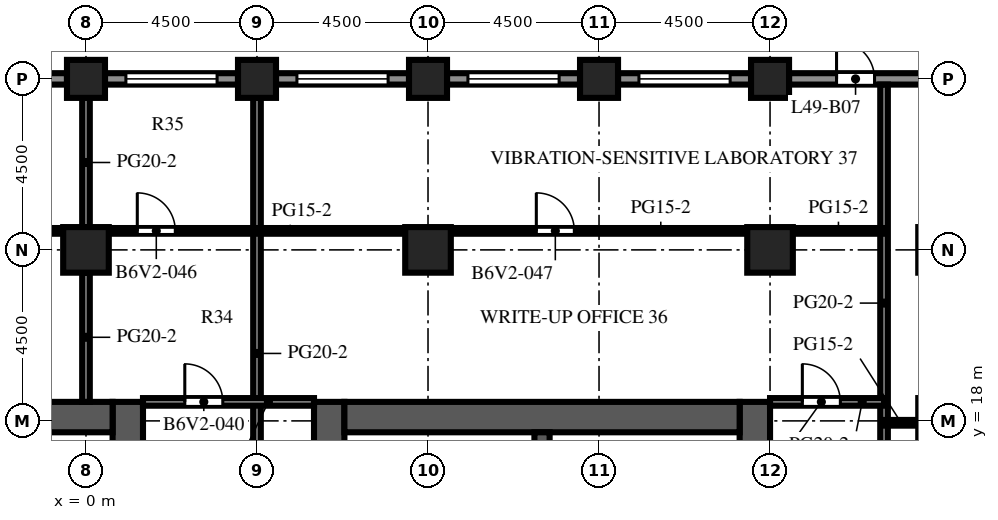
"""IFC4 building model, lengths in metres.
Left out: names, types, materials, properties, quantities, classifications, styles, units other than length and angle.
Written with IfcOpenShell. Run it as: python <this file> out.ifc"""

import sys

from ifc_helpers import new_model, si_unit, direction, frame, frame_2d, origin, origin_2d, place, context, subcontext, project, spatial, rectangle, extrude, element, fill, save


model = new_model("IFC4")
c1 = context("Model", 3, precision=1e-05, world=origin(), true_north=direction((0.0, 1.0)))
c2 = subcontext(c1, "Body", "Model", "MODEL_VIEW")
j1 = project(units=[si_unit("LENGTHUNIT", "METRE"), si_unit("PLANEANGLEUNIT", "RADIAN")], contexts=[c1])
p1 = place(None, origin())
s1 = spatial("IfcSite", under=j1, at=p1, CompositionType="ELEMENT")
p2 = place(p1, origin())
s2 = spatial("IfcBuilding", under=s1, at=p2, CompositionType="ELEMENT")
p3 = place(p2, frame((0.0, 0.0, 216.1)))
s3 = spatial("IfcBuildingStorey", under=s2, at=p3, CompositionType="ELEMENT", Elevation=216.1)
for number, where, z_axis, x_axis in (
    (1, (0.0, 27.0, 0.0), (0.0, 0.0, 1.0), (1.0, 0.0, 0.0)),
    (2, (4.5, 27.0, 0.0), (0.0, 0.0, 1.0), (1.0, 0.0, 0.0)),
    (3, (9.0, 27.0, 0.0), (0.0, 0.0, 1.0), (1.0, 0.0, 0.0)),
    (4, (13.5, 27.0, 0.0), (0.0, 0.0, 1.0), (1.0, 0.0, 0.0)),
    (5, (18.0, 27.0, 0.0), (0.0, 0.0, 1.0), (1.0, 0.0, 0.0)),
):
    element("IfcColumn", number, at=place(p3, frame(where, z_axis=z_axis, x_axis=x_axis)), inside=s3, PredefinedType="COLUMN", context=c2, shape_type="SweptSolid", body=[
        extrude(rectangle(XDim=1.0, YDim=1.0, at=origin_2d()), origin(), (0.0, 0.0, 1.0), 4.1),
    ])
for number, where, z_axis, x_axis in (
    (6, (0.0, 22.5, 0.0), (0.0, 0.0, 1.0), (1.0, 0.0, 0.0)),
    (7, (9.0, 22.5, 0.0), (0.0, 0.0, 1.0), (1.0, 0.0, 0.0)),
    (8, (18.0, 22.5, 0.0), (0.0, 0.0, 1.0), (1.0, 0.0, 0.0)),
):
    element("IfcColumn", number, at=place(p3, frame(where, z_axis=z_axis, x_axis=x_axis)), inside=s3, PredefinedType="COLUMN", context=c2, shape_type="SweptSolid", body=[
        extrude(rectangle(XDim=1.2, YDim=1.2, at=origin_2d()), origin(), (0.0, 0.0, 1.0), 4.1),
    ])
p4 = place(p3, frame((1.1, -9.0, 0.0), z_axis=(0.0, 0.0, 1.0), x_axis=(0.0, 1.0, 0.0)))
e9 = element("IfcWall", 9, at=p4, inside=s3, PredefinedType="SHEAR", context=c2, shape_type="SweptSolid", body=[
    extrude(rectangle(XDim=27.5, YDim=0.8, at=frame_2d((13.75, 0.0))), origin(), (0.0, 0.0, 1.0), 4.1),
])
p5 = place(p4, frame((12.55, 0.0, 0.0)))
e10 = element("IfcOpeningElement", 10, at=p5, cuts=e9, PredefinedType="OPENING", context=c2, shape_type="SweptSolid", body=[
    extrude(rectangle(XDim=2.4, YDim=2.4, at=frame_2d((1.2, 1.2))), frame((0.0, 0.41, 0.0), z_axis=(0.0, -1.0, 0.0), x_axis=(1.0, 0.0, 0.0)), (0.0, 0.0, 1.0), 0.82),
])
p6 = place(p4, frame((5.5, 0.0, 0.0)))
e11 = element("IfcOpeningElement", 11, at=p6, cuts=e9, PredefinedType="OPENING", context=c2, shape_type="SweptSolid", body=[
    extrude(rectangle(XDim=0.95, YDim=2.1, at=frame_2d((0.475, 1.05))), frame((0.0, 0.41, 0.0), z_axis=(0.0, -1.0, 0.0), x_axis=(1.0, 0.0, 0.0)), (0.0, 0.0, 1.0), 0.82),
])
p7 = place(p4, frame((23.475, 0.0, 0.0)))
e12 = element("IfcOpeningElement", 12, at=p7, cuts=e9, PredefinedType="OPENING", context=c2, shape_type="SweptSolid", body=[
    extrude(rectangle(XDim=1.2, YDim=2.1, at=frame_2d((0.6, 1.05))), frame((0.0, 0.41, 0.0), z_axis=(0.0, -1.0, 0.0), x_axis=(1.0, 0.0, 0.0)), (0.0, 0.0, 1.0), 0.82),
])
p8 = place(p3, frame((-9.7, 18.1, 0.0), z_axis=(0.0, 0.0, 1.0), x_axis=(1.0, 0.0, 0.0)))
e13 = element("IfcWall", 13, at=p8, inside=s3, PredefinedType="SHEAR", context=c2, shape_type="SweptSolid", body=[
    extrude(rectangle(XDim=10.4, YDim=0.8, at=frame_2d((5.2, 0.0))), origin(), (0.0, 0.0, 1.0), 4.1),
])
p9 = place(p3, frame((6.4, -9.0, 0.0), z_axis=(0.0, 0.0, 1.0), x_axis=(0.0, 1.0, 0.0)))
e14 = element("IfcWall", 14, at=p9, inside=s3, PredefinedType="SHEAR", context=c2, shape_type="SweptSolid", body=[
    extrude(rectangle(XDim=27.5, YDim=0.8, at=frame_2d((13.75, 0.0))), origin(), (0.0, 0.0, 1.0), 4.1),
])
p10 = place(p9, frame((12.55, 0.0, 0.0)))
e15 = element("IfcOpeningElement", 15, at=p10, cuts=e14, PredefinedType="OPENING", context=c2, shape_type="SweptSolid", body=[
    extrude(rectangle(XDim=2.4, YDim=2.4, at=frame_2d((1.2, 1.2))), frame((0.0, 0.41, 0.0), z_axis=(0.0, -1.0, 0.0), x_axis=(1.0, 0.0, 0.0)), (0.0, 0.0, 1.0), 0.82),
])
p11 = place(p9, frame((5.5, 0.0, 0.0)))
e16 = element("IfcOpeningElement", 16, at=p11, cuts=e14, PredefinedType="OPENING", context=c2, shape_type="SweptSolid", body=[
    extrude(rectangle(XDim=0.95, YDim=2.1, at=frame_2d((0.475, 1.05))), frame((0.0, 0.41, 0.0), z_axis=(0.0, -1.0, 0.0), x_axis=(1.0, 0.0, 0.0)), (0.0, 0.0, 1.0), 0.82),
])
p12 = place(p9, frame((23.475, 0.0, 0.0)))
e17 = element("IfcOpeningElement", 17, at=p12, cuts=e14, PredefinedType="OPENING", context=c2, shape_type="SweptSolid", body=[
    extrude(rectangle(XDim=1.2, YDim=2.1, at=frame_2d((0.6, 1.05))), frame((0.0, 0.41, 0.0), z_axis=(0.0, -1.0, 0.0), x_axis=(1.0, 0.0, 0.0)), (0.0, 0.0, 1.0), 0.82),
])
p13 = place(p3, frame((17.6, -9.0, 0.0), z_axis=(0.0, 0.0, 1.0), x_axis=(0.0, 1.0, 0.0)))
e18 = element("IfcWall", 18, at=p13, inside=s3, PredefinedType="SHEAR", context=c2, shape_type="SweptSolid", body=[
    extrude(rectangle(XDim=27.5, YDim=0.8, at=frame_2d((13.75, 0.0))), origin(), (0.0, 0.0, 1.0), 4.1),
])
p14 = place(p13, frame((12.55, 0.0, 0.0)))
e19 = element("IfcOpeningElement", 19, at=p14, cuts=e18, PredefinedType="OPENING", context=c2, shape_type="SweptSolid", body=[
    extrude(rectangle(XDim=2.4, YDim=2.4, at=frame_2d((1.2, 1.2))), frame((0.0, 0.41, 0.0), z_axis=(0.0, -1.0, 0.0), x_axis=(1.0, 0.0, 0.0)), (0.0, 0.0, 1.0), 0.82),
])
p15 = place(p13, frame((6.825, 0.0, 0.0)))
e20 = element("IfcOpeningElement", 20, at=p15, cuts=e18, PredefinedType="OPENING", context=c2, shape_type="SweptSolid", body=[
    extrude(rectangle(XDim=1.2, YDim=2.1, at=frame_2d((0.6, 1.05))), frame((0.0, 0.41, 0.0), z_axis=(0.0, -1.0, 0.0), x_axis=(1.0, 0.0, 0.0)), (0.0, 0.0, 1.0), 0.82),
])
p16 = place(p13, frame((19.475, 0.0, 0.0)))
e21 = element("IfcOpeningElement", 21, at=p16, cuts=e18, PredefinedType="OPENING", context=c2, shape_type="SweptSolid", body=[
    extrude(rectangle(XDim=1.2, YDim=2.1, at=frame_2d((0.6, 1.05))), frame((0.0, 0.41, 0.0), z_axis=(0.0, -1.0, 0.0), x_axis=(1.0, 0.0, 0.0)), (0.0, 0.0, 1.0), 0.82),
])
p17 = place(p3, frame((6.8, 18.1, 0.0), z_axis=(0.0, 0.0, 1.0), x_axis=(1.0, 0.0, 0.0)))
e22 = element("IfcWall", 22, at=p17, inside=s3, PredefinedType="SHEAR", context=c2, shape_type="SweptSolid", body=[
    extrude(rectangle(XDim=10.4, YDim=0.8, at=frame_2d((5.2, 0.0))), origin(), (0.0, 0.0, 1.0), 4.1),
])
p18 = place(p3, frame((12.0, 10.2, 0.0), z_axis=(0.0, 0.0, 1.0), x_axis=(0.0, 1.0, 0.0)))
e23 = element("IfcWall", 23, at=p18, inside=s3, PredefinedType="SHEAR", context=c2, shape_type="SweptSolid", body=[
    extrude(rectangle(XDim=7.5, YDim=0.4, at=frame_2d((3.75, 0.0))), origin(), (0.0, 0.0, 1.0), 4.1),
])
p19 = place(p3, frame((18.5, 27.0, 0.0), z_axis=(0.0, 0.0, 1.0), x_axis=(1.0, 0.0, 0.0)))
e24 = element("IfcWall", 24, at=p19, inside=s3, PredefinedType="SOLIDWALL", context=c2, shape_type="SweptSolid", body=[
    extrude(rectangle(XDim=3.5, YDim=0.3, at=frame_2d((1.75, 0.0))), origin(), (0.0, 0.0, 1.0), 2.7),
])
p20 = place(p19, frame((1.25, 0.0, 0.0)))
e25 = element("IfcOpeningElement", 25, at=p20, cuts=e24, PredefinedType="OPENING", context=c2, shape_type="SweptSolid", body=[
    extrude(rectangle(XDim=1.0, YDim=2.2, at=frame_2d((0.5, 1.1))), frame((0.0, 0.16, 0.0), z_axis=(0.0, -1.0, 0.0), x_axis=(1.0, 0.0, 0.0)), (0.0, 0.0, 1.0), 0.32),
])
p21 = place(p3, frame((14.0, 27.0, 0.0), z_axis=(0.0, 0.0, 1.0), x_axis=(1.0, 0.0, 0.0)))
e26 = element("IfcWall", 26, at=p21, inside=s3, PredefinedType="SOLIDWALL", context=c2, shape_type="SweptSolid", body=[
    extrude(rectangle(XDim=3.5, YDim=0.3, at=frame_2d((1.75, 0.0))), origin(), (0.0, 0.0, 1.0), 2.7),
])
p22 = place(p21, frame((0.55, 0.0, 0.8)))
e27 = element("IfcOpeningElement", 27, at=p22, cuts=e26, PredefinedType="OPENING", context=c2, shape_type="SweptSolid", body=[
    extrude(rectangle(XDim=2.4, YDim=1.7, at=frame_2d((1.2, 0.85))), frame((0.0, 0.16, 0.0), z_axis=(0.0, -1.0, 0.0), x_axis=(1.0, 0.0, 0.0)), (0.0, 0.0, 1.0), 0.32),
])
p23 = place(p3, frame((9.5, 27.0, 0.0), z_axis=(0.0, 0.0, 1.0), x_axis=(1.0, 0.0, 0.0)))
e28 = element("IfcWall", 28, at=p23, inside=s3, PredefinedType="SOLIDWALL", context=c2, shape_type="SweptSolid", body=[
    extrude(rectangle(XDim=3.5, YDim=0.3, at=frame_2d((1.75, 0.0))), origin(), (0.0, 0.0, 1.0), 2.7),
])
p24 = place(p23, frame((0.55, 0.0, 0.8)))
e29 = element("IfcOpeningElement", 29, at=p24, cuts=e28, PredefinedType="OPENING", context=c2, shape_type="SweptSolid", body=[
    extrude(rectangle(XDim=2.4, YDim=1.7, at=frame_2d((1.2, 0.85))), frame((0.0, 0.16, 0.0), z_axis=(0.0, -1.0, 0.0), x_axis=(1.0, 0.0, 0.0)), (0.0, 0.0, 1.0), 0.32),
])
p25 = place(p3, frame((5.0, 27.0, 0.0), z_axis=(0.0, 0.0, 1.0), x_axis=(1.0, 0.0, 0.0)))
e30 = element("IfcWall", 30, at=p25, inside=s3, PredefinedType="SOLIDWALL", context=c2, shape_type="SweptSolid", body=[
    extrude(rectangle(XDim=3.5, YDim=0.3, at=frame_2d((1.75, 0.0))), origin(), (0.0, 0.0, 1.0), 2.7),
])
p26 = place(p25, frame((0.55, 0.0, 0.8)))
e31 = element("IfcOpeningElement", 31, at=p26, cuts=e30, PredefinedType="OPENING", context=c2, shape_type="SweptSolid", body=[
    extrude(rectangle(XDim=2.4, YDim=1.7, at=frame_2d((1.2, 0.85))), frame((0.0, 0.16, 0.0), z_axis=(0.0, -1.0, 0.0), x_axis=(1.0, 0.0, 0.0)), (0.0, 0.0, 1.0), 0.32),
])
p27 = place(p3, frame((0.5, 27.0, 0.0), z_axis=(0.0, 0.0, 1.0), x_axis=(1.0, 0.0, 0.0)))
e32 = element("IfcWall", 32, at=p27, inside=s3, PredefinedType="SOLIDWALL", context=c2, shape_type="SweptSolid", body=[
    extrude(rectangle(XDim=3.5, YDim=0.3, at=frame_2d((1.75, 0.0))), origin(), (0.0, 0.0, 1.0), 2.7),
])
p28 = place(p27, frame((0.55, 0.0, 0.8)))
e33 = element("IfcOpeningElement", 33, at=p28, cuts=e32, PredefinedType="OPENING", context=c2, shape_type="SweptSolid", body=[
    extrude(rectangle(XDim=2.4, YDim=1.7, at=frame_2d((1.2, 0.85))), frame((0.0, 0.16, 0.0), z_axis=(0.0, -1.0, 0.0), x_axis=(1.0, 0.0, 0.0)), (0.0, 0.0, 1.0), 0.32),
])
p29 = place(p3, frame((-4.0, 27.0, 0.0), z_axis=(0.0, 0.0, 1.0), x_axis=(1.0, 0.0, 0.0)))
e34 = element("IfcWall", 34, at=p29, inside=s3, PredefinedType="SOLIDWALL", context=c2, shape_type="SweptSolid", body=[
    extrude(rectangle(XDim=3.5, YDim=0.3, at=frame_2d((1.75, 0.0))), origin(), (0.0, 0.0, 1.0), 2.7),
])
p30 = place(p29, frame((0.55, 0.0, 0.8)))
e35 = element("IfcOpeningElement", 35, at=p30, cuts=e34, PredefinedType="OPENING", context=c2, shape_type="SweptSolid", body=[
    extrude(rectangle(XDim=2.4, YDim=1.7, at=frame_2d((1.2, 0.85))), frame((0.0, 0.16, 0.0), z_axis=(0.0, -1.0, 0.0), x_axis=(1.0, 0.0, 0.0)), (0.0, 0.0, 1.0), 0.32),
])
p31 = place(p3, frame((-0.6, 15.075, 0.0), z_axis=(0.0, 0.0, 1.0), x_axis=(0.0, 1.0, 0.0)))
e36 = element("IfcWall", 36, at=p31, inside=s3, PredefinedType="PARTITIONING", context=c2, shape_type="SweptSolid", body=[
    extrude(rectangle(XDim=2.625, YDim=0.1, at=frame_2d((1.312, 0.0))), origin(), (0.0, 0.0, 1.0), 3.5),
])
p32 = place(p31, frame((0.812, 0.0, 0.0)))
e37 = element("IfcOpeningElement", 37, at=p32, cuts=e36, PredefinedType="OPENING", context=c2, shape_type="SweptSolid", body=[
    extrude(rectangle(XDim=1.0, YDim=2.1, at=frame_2d((0.5, 1.05))), frame((0.0, 0.06, 0.0), z_axis=(0.0, -1.0, 0.0), x_axis=(1.0, 0.0, 0.0)), (0.0, 0.0, 1.0), 0.12),
])
p33 = place(p3, frame((8.1, 15.075, 0.0), z_axis=(0.0, 0.0, 1.0), x_axis=(0.0, 1.0, 0.0)))
e38 = element("IfcWall", 38, at=p33, inside=s3, PredefinedType="PARTITIONING", context=c2, shape_type="SweptSolid", body=[
    extrude(rectangle(XDim=2.625, YDim=0.1, at=frame_2d((1.312, 0.0))), origin(), (0.0, 0.0, 1.0), 3.5),
])
p34 = place(p33, frame((0.812, 0.0, 0.0)))
e39 = element("IfcOpeningElement", 39, at=p34, cuts=e38, PredefinedType="OPENING", context=c2, shape_type="SweptSolid", body=[
    extrude(rectangle(XDim=1.0, YDim=2.1, at=frame_2d((0.5, 1.05))), frame((0.0, 0.06, 0.0), z_axis=(0.0, -1.0, 0.0), x_axis=(1.0, 0.0, 0.0)), (0.0, 0.0, 1.0), 0.12),
])
for number, where, z_axis, x_axis in (
    (40, (0.0, 18.5, 0.0), (0.0, 0.0, 1.0), (0.0, 1.0, 0.0)),
    (41, (0.0, 23.1, 0.0), (0.0, 0.0, 1.0), (0.0, 1.0, 0.0)),
):
    element("IfcWall", number, at=place(p3, frame(where, z_axis=z_axis, x_axis=x_axis)), inside=s3, PredefinedType="PARTITIONING", context=c2, shape_type="SweptSolid", body=[
        extrude(rectangle(XDim=3.4, YDim=0.2, at=frame_2d((1.7, 0.0))), origin(), (0.0, 0.0, 1.0), 3.5),
    ])
p35 = place(p3, frame((4.5, 26.5, 0.0), z_axis=(0.0, 0.0, 1.0), x_axis=(0.0, -1.0, 0.0)))
e42 = element("IfcWall", 42, at=p35, inside=s3, PredefinedType="PARTITIONING", context=c2, shape_type="SweptSolid", body=[
    extrude(rectangle(XDim=19.8, YDim=0.2, at=frame_2d((9.9, 0.0))), origin(), (0.0, 0.0, 1.0), 3.5),
])
p36 = place(p35, frame((13.45, 0.0, 0.0)))
e43 = element("IfcOpeningElement", 43, at=p36, cuts=e42, PredefinedType="OPENING", context=c2, shape_type="SweptSolid", body=[
    extrude(rectangle(XDim=1.0, YDim=2.1, at=frame_2d((0.5, 1.05))), frame((0.0, 0.11, 0.0), z_axis=(0.0, -1.0, 0.0), x_axis=(1.0, 0.0, 0.0)), (0.0, 0.0, 1.0), 0.22),
])
p37 = place(p3, frame((21.0, 26.85, 0.0), z_axis=(0.0, 0.0, 1.0), x_axis=(0.0, -1.0, 0.0)))
e44 = element("IfcWall", 44, at=p37, inside=s3, PredefinedType="PARTITIONING", context=c2, shape_type="SweptSolid", body=[
    extrude(rectangle(XDim=20.6, YDim=0.2, at=frame_2d((10.3, 0.0))), origin(), (0.0, 0.0, 1.0), 3.5),
])
p38 = place(p37, frame((11.5, 0.0, 0.0)))
e45 = element("IfcOpeningElement", 45, at=p38, cuts=e44, PredefinedType="OPENING", context=c2, shape_type="SweptSolid", body=[
    extrude(rectangle(XDim=1.0, YDim=2.1, at=frame_2d((0.5, 1.05))), frame((0.0, 0.11, 0.0), z_axis=(0.0, -1.0, 0.0), x_axis=(1.0, 0.0, 0.0)), (0.0, 0.0, 1.0), 0.22),
])
p39 = place(p3, frame((21.0, 17.95, 0.0), z_axis=(0.0, 0.0, 1.0), x_axis=(1.0, 0.0, 0.0)))
e46 = element("IfcWall", 46, at=p39, inside=s3, PredefinedType="PARTITIONING", context=c2, shape_type="SweptSolid", body=[
    extrude(rectangle(XDim=0.9, YDim=0.15, at=frame_2d((0.45, 0.0))), origin(), (0.0, 0.0, 1.0), 3.5),
])
p40 = place(p3, frame((1.5, 18.5, 0.0), z_axis=(0.0, 0.0, 1.0), x_axis=(1.0, 0.0, 0.0)))
e47 = element("IfcWall", 47, at=p40, inside=s3, PredefinedType="PARTITIONING", context=c2, shape_type="SweptSolid", body=[
    extrude(rectangle(XDim=4.5, YDim=0.2, at=frame_2d((2.25, 0.0))), origin(), (0.0, 0.0, 1.0), 3.5),
])
p41 = place(p40, frame((1.1, 0.0, 0.0)))
e48 = element("IfcOpeningElement", 48, at=p41, cuts=e47, PredefinedType="OPENING", context=c2, shape_type="SweptSolid", body=[
    extrude(rectangle(XDim=1.0, YDim=2.1, at=frame_2d((0.5, 1.05))), frame((0.0, 0.11, 0.0), z_axis=(0.0, -1.0, 0.0), x_axis=(1.0, 0.0, 0.0)), (0.0, 0.0, 1.0), 0.22),
])
p42 = place(p3, frame((18.0, 18.5, 0.0), z_axis=(0.0, 0.0, 1.0), x_axis=(1.0, 0.0, 0.0)))
e49 = element("IfcWall", 49, at=p42, inside=s3, PredefinedType="PARTITIONING", context=c2, shape_type="SweptSolid", body=[
    extrude(rectangle(XDim=3.0, YDim=0.2, at=frame_2d((1.5, 0.0))), origin(), (0.0, 0.0, 1.0), 3.5),
])
p43 = place(p42, frame((0.85, 0.0, 0.0)))
e50 = element("IfcOpeningElement", 50, at=p43, cuts=e49, PredefinedType="OPENING", context=c2, shape_type="SweptSolid", body=[
    extrude(rectangle(XDim=1.0, YDim=2.1, at=frame_2d((0.5, 1.05))), frame((0.0, 0.11, 0.0), z_axis=(0.0, -1.0, 0.0), x_axis=(1.0, 0.0, 0.0)), (0.0, 0.0, 1.0), 0.22),
])
p44 = place(p3, frame((-8.4, 23.0, 0.0), z_axis=(0.0, 0.0, 1.0), x_axis=(1.0, 0.0, 0.0)))
e51 = element("IfcWall", 51, at=p44, inside=s3, PredefinedType="PARTITIONING", context=c2, shape_type="SweptSolid", body=[
    extrude(rectangle(XDim=7.8, YDim=0.15, at=frame_2d((3.9, 0.0))), origin(), (0.0, 0.0, 1.0), 3.5),
])
p45 = place(p44, frame((2.0, 0.0, 0.0)))
e52 = element("IfcOpeningElement", 52, at=p45, cuts=e51, PredefinedType="OPENING", context=c2, shape_type="SweptSolid", body=[
    extrude(rectangle(XDim=1.0, YDim=2.1, at=frame_2d((0.5, 1.05))), frame((0.0, 0.085, 0.0), z_axis=(0.0, -1.0, 0.0), x_axis=(1.0, 0.0, 0.0)), (0.0, 0.0, 1.0), 0.17),
])
p46 = place(p3, frame((0.6, 23.0, 0.0), z_axis=(0.0, 0.0, 1.0), x_axis=(1.0, 0.0, 0.0)))
e53 = element("IfcWall", 53, at=p46, inside=s3, PredefinedType="PARTITIONING", context=c2, shape_type="SweptSolid", body=[
    extrude(rectangle(XDim=7.8, YDim=0.15, at=frame_2d((3.9, 0.0))), origin(), (0.0, 0.0, 1.0), 3.5),
])
p47 = place(p46, frame((0.75, 0.0, 0.0)))
e54 = element("IfcOpeningElement", 54, at=p47, cuts=e53, PredefinedType="OPENING", context=c2, shape_type="SweptSolid", body=[
    extrude(rectangle(XDim=1.0, YDim=2.1, at=frame_2d((0.5, 1.05))), frame((0.0, 0.085, 0.0), z_axis=(0.0, -1.0, 0.0), x_axis=(1.0, 0.0, 0.0)), (0.0, 0.0, 1.0), 0.17),
])
p48 = place(p3, frame((9.6, 23.0, 0.0), z_axis=(0.0, 0.0, 1.0), x_axis=(1.0, 0.0, 0.0)))
e55 = element("IfcWall", 55, at=p48, inside=s3, PredefinedType="PARTITIONING", context=c2, shape_type="SweptSolid", body=[
    extrude(rectangle(XDim=7.8, YDim=0.15, at=frame_2d((3.9, 0.0))), origin(), (0.0, 0.0, 1.0), 3.5),
])
p49 = place(p48, frame((2.25, 0.0, 0.0)))
e56 = element("IfcOpeningElement", 56, at=p49, cuts=e55, PredefinedType="OPENING", context=c2, shape_type="SweptSolid", body=[
    extrude(rectangle(XDim=1.0, YDim=2.1, at=frame_2d((0.5, 1.05))), frame((0.0, 0.085, 0.0), z_axis=(0.0, -1.0, 0.0), x_axis=(1.0, 0.0, 0.0)), (0.0, 0.0, 1.0), 0.17),
])
p50 = place(p3, frame((18.6, 23.0, 0.0), z_axis=(0.0, 0.0, 1.0), x_axis=(1.0, 0.0, 0.0)))
e57 = element("IfcWall", 57, at=p50, inside=s3, PredefinedType="PARTITIONING", context=c2, shape_type="SweptSolid", body=[
    extrude(rectangle(XDim=2.4, YDim=0.15, at=frame_2d((1.2, 0.0))), origin(), (0.0, 0.0, 1.0), 3.5),
])
p51 = place(p20, origin())
e58 = element("IfcDoor", 58, at=p51, inside=s3, OperationType="SINGLE_SWING_LEFT", PredefinedType="DOOR", context=c2, shape_type="SweptSolid", body=[
    extrude(rectangle(XDim=1.0, YDim=2.2, at=frame_2d((0.5, 1.1))), frame((0.0, 0.025, 0.0), z_axis=(0.0, -1.0, 0.0), x_axis=(1.0, 0.0, 0.0)), (0.0, 0.0, 1.0), 0.05),
])
fill(e25, e58)
p52 = place(p22, origin())
e59 = element("IfcWindow", 59, at=p52, inside=s3, PartitioningType="SINGLE_PANEL", PredefinedType="WINDOW", context=c2, shape_type="SweptSolid", body=[
    extrude(rectangle(XDim=2.4, YDim=1.7, at=frame_2d((1.2, 0.85))), frame((0.0, 0.03, 0.0), z_axis=(0.0, -1.0, 0.0), x_axis=(1.0, 0.0, 0.0)), (0.0, 0.0, 1.0), 0.06),
])
fill(e27, e59)
p53 = place(p24, origin())
e60 = element("IfcWindow", 60, at=p53, inside=s3, PartitioningType="SINGLE_PANEL", PredefinedType="WINDOW", context=c2, shape_type="SweptSolid", body=[
    extrude(rectangle(XDim=2.4, YDim=1.7, at=frame_2d((1.2, 0.85))), frame((0.0, 0.03, 0.0), z_axis=(0.0, -1.0, 0.0), x_axis=(1.0, 0.0, 0.0)), (0.0, 0.0, 1.0), 0.06),
])
fill(e29, e60)
p54 = place(p26, origin())
e61 = element("IfcWindow", 61, at=p54, inside=s3, PartitioningType="SINGLE_PANEL", PredefinedType="WINDOW", context=c2, shape_type="SweptSolid", body=[
    extrude(rectangle(XDim=2.4, YDim=1.7, at=frame_2d((1.2, 0.85))), frame((0.0, 0.03, 0.0), z_axis=(0.0, -1.0, 0.0), x_axis=(1.0, 0.0, 0.0)), (0.0, 0.0, 1.0), 0.06),
])
fill(e31, e61)
p55 = place(p28, origin())
e62 = element("IfcWindow", 62, at=p55, inside=s3, PartitioningType="SINGLE_PANEL", PredefinedType="WINDOW", context=c2, shape_type="SweptSolid", body=[
    extrude(rectangle(XDim=2.4, YDim=1.7, at=frame_2d((1.2, 0.85))), frame((0.0, 0.03, 0.0), z_axis=(0.0, -1.0, 0.0), x_axis=(1.0, 0.0, 0.0)), (0.0, 0.0, 1.0), 0.06),
])
fill(e33, e62)
p56 = place(p41, origin())
e63 = element("IfcDoor", 63, at=p56, inside=s3, OperationType="SINGLE_SWING_LEFT", PredefinedType="DOOR", context=c2, shape_type="SweptSolid", body=[
    extrude(rectangle(XDim=1.0, YDim=2.1, at=frame_2d((0.5, 1.05))), frame((0.0, 0.025, 0.0), z_axis=(0.0, -1.0, 0.0), x_axis=(1.0, 0.0, 0.0)), (0.0, 0.0, 1.0), 0.05),
])
fill(e48, e63)
p57 = place(p43, origin())
e64 = element("IfcDoor", 64, at=p57, inside=s3, OperationType="SINGLE_SWING_LEFT", PredefinedType="DOOR", context=c2, shape_type="SweptSolid", body=[
    extrude(rectangle(XDim=1.0, YDim=2.1, at=frame_2d((0.5, 1.05))), frame((0.0, 0.025, 0.0), z_axis=(0.0, -1.0, 0.0), x_axis=(1.0, 0.0, 0.0)), (0.0, 0.0, 1.0), 0.05),
])
fill(e50, e64)
p58 = place(p47, origin())
e65 = element("IfcDoor", 65, at=p58, inside=s3, OperationType="SINGLE_SWING_LEFT", PredefinedType="DOOR", context=c2, shape_type="SweptSolid", body=[
    extrude(rectangle(XDim=1.0, YDim=2.1, at=frame_2d((0.5, 1.05))), frame((0.0, 0.025, 0.0), z_axis=(0.0, -1.0, 0.0), x_axis=(1.0, 0.0, 0.0)), (0.0, 0.0, 1.0), 0.05),
])
fill(e54, e65)
p59 = place(p49, origin())
e66 = element("IfcDoor", 66, at=p59, inside=s3, OperationType="SINGLE_SWING_LEFT", PredefinedType="DOOR", context=c2, shape_type="SweptSolid", body=[
    extrude(rectangle(XDim=1.0, YDim=2.1, at=frame_2d((0.5, 1.05))), frame((0.0, 0.025, 0.0), z_axis=(0.0, -1.0, 0.0), x_axis=(1.0, 0.0, 0.0)), (0.0, 0.0, 1.0), 0.05),
])
fill(e56, e66)
save(model, sys.argv[1])
